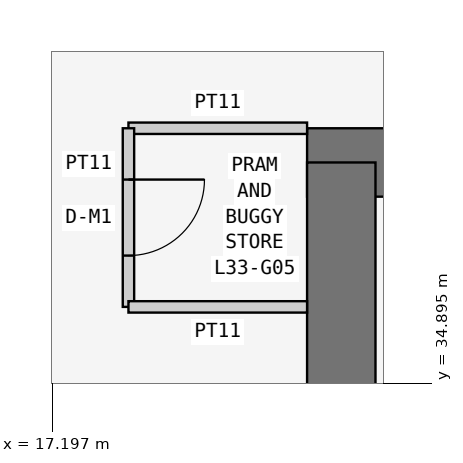
"""IFC4 building model, lengths in metres.
Left out: names, types, materials, properties, quantities, classifications, styles, units other than length and angle.
Written with IfcOpenShell. Run it as: python <this file> out.ifc"""

import sys

from ifc_helpers import new_model, si_unit, direction, frame, frame_2d, origin, place, context, subcontext, project, spatial, rectangle, extrude, element, fill, save


model = new_model("IFC4")
c1 = context("Model", 3, precision=1e-05, world=origin(), true_north=direction((0.0, 1.0)))
c2 = subcontext(c1, "Body", "Model", "MODEL_VIEW")
j1 = project(units=[si_unit("LENGTHUNIT", "METRE"), si_unit("PLANEANGLEUNIT", "RADIAN")], contexts=[c1])
p1 = place(None, origin())
s1 = spatial("IfcSite", under=j1, at=p1, CompositionType="ELEMENT")
p2 = place(p1, origin())
s2 = spatial("IfcBuilding", under=s1, at=p2, CompositionType="ELEMENT")
p3 = place(p2, frame((0.0, 0.0, 130.5)))
s3 = spatial("IfcBuildingStorey", under=s2, at=p3, CompositionType="ELEMENT", Elevation=130.5)
p4 = place(p3, frame((37.8, 37.8, 0.0), z_axis=(0.0, 0.0, 1.0), x_axis=(-1.0, 0.0, 0.0)))
e1 = element("IfcWall", 1, at=p4, inside=s3, PredefinedType="SHEAR", context=c2, shape_type="SweptSolid", body=[
    extrude(rectangle(XDim=17.25, YDim=0.9, at=frame_2d((8.625, 0.0))), origin(), (0.0, 0.0, 1.0), 3.6),
])
p5 = place(p3, frame((21.0, 37.8, 0.0), z_axis=(0.0, 0.0, 1.0), x_axis=(0.0, -1.0, 0.0)))
e2 = element("IfcWall", 2, at=p5, inside=s3, PredefinedType="SHEAR", context=c2, shape_type="SweptSolid", body=[
    extrude(rectangle(XDim=17.25, YDim=0.9, at=frame_2d((8.625, 0.0))), origin(), (0.0, 0.0, 1.0), 3.6),
])
p6 = place(p5, frame((5.4, 0.0, 0.0)))
e3 = element("IfcOpeningElement", 3, at=p6, cuts=e2, PredefinedType="OPENING", context=c2, shape_type="SweptSolid", body=[
    extrude(rectangle(XDim=1.2, YDim=2.1, at=frame_2d((0.6, 1.05))), frame((0.0, 0.46, 0.0), z_axis=(0.0, -1.0, 0.0), x_axis=(1.0, 0.0, 0.0)), (0.0, 0.0, 1.0), 0.92),
])
p7 = place(p3, frame((20.55, 38.25, 0.0), z_axis=(0.0, 0.0, 1.0), x_axis=(-1.0, 0.0, 0.0)))
e4 = element("IfcWall", 4, at=p7, inside=s3, PredefinedType="PARTITIONING", context=c2, shape_type="SweptSolid", body=[
    extrude(rectangle(XDim=2.35, YDim=0.15, at=frame_2d((1.175, 0.0))), origin(), (0.0, 0.0, 1.0), 3.45),
])
p8 = place(p3, frame((18.2, 38.25, 0.0), z_axis=(0.0, 0.0, 1.0), x_axis=(0.0, -1.0, 0.0)))
e5 = element("IfcWall", 5, at=p8, inside=s3, PredefinedType="PARTITIONING", context=c2, shape_type="SweptSolid", body=[
    extrude(rectangle(XDim=2.35, YDim=0.15, at=frame_2d((1.175, 0.0))), origin(), (0.0, 0.0, 1.0), 3.45),
])
p9 = place(p8, frame((0.675, 0.0, 0.0)))
e6 = element("IfcOpeningElement", 6, at=p9, cuts=e5, PredefinedType="OPENING", context=c2, shape_type="SweptSolid", body=[
    extrude(rectangle(XDim=1.0, YDim=2.1, at=frame_2d((0.5, 1.05))), frame((0.0, 0.085, 0.0), z_axis=(0.0, -1.0, 0.0), x_axis=(1.0, 0.0, 0.0)), (0.0, 0.0, 1.0), 0.17),
])
p10 = place(p3, frame((18.2, 35.9, 0.0), z_axis=(0.0, 0.0, 1.0), x_axis=(1.0, 0.0, 0.0)))
e7 = element("IfcWall", 7, at=p10, inside=s3, PredefinedType="PARTITIONING", context=c2, shape_type="SweptSolid", body=[
    extrude(rectangle(XDim=2.35, YDim=0.15, at=frame_2d((1.175, 0.0))), origin(), (0.0, 0.0, 1.0), 3.45),
])
p11 = place(p9, origin())
e8 = element("IfcDoor", 8, at=p11, inside=s3, OperationType="SINGLE_SWING_LEFT", PredefinedType="DOOR", context=c2, shape_type="SweptSolid", body=[
    extrude(rectangle(XDim=1.0, YDim=2.1, at=frame_2d((0.5, 1.05))), frame((0.0, 0.025, 0.0), z_axis=(0.0, -1.0, 0.0), x_axis=(1.0, 0.0, 0.0)), (0.0, 0.0, 1.0), 0.05),
])
fill(e6, e8)
save(model, sys.argv[1])
